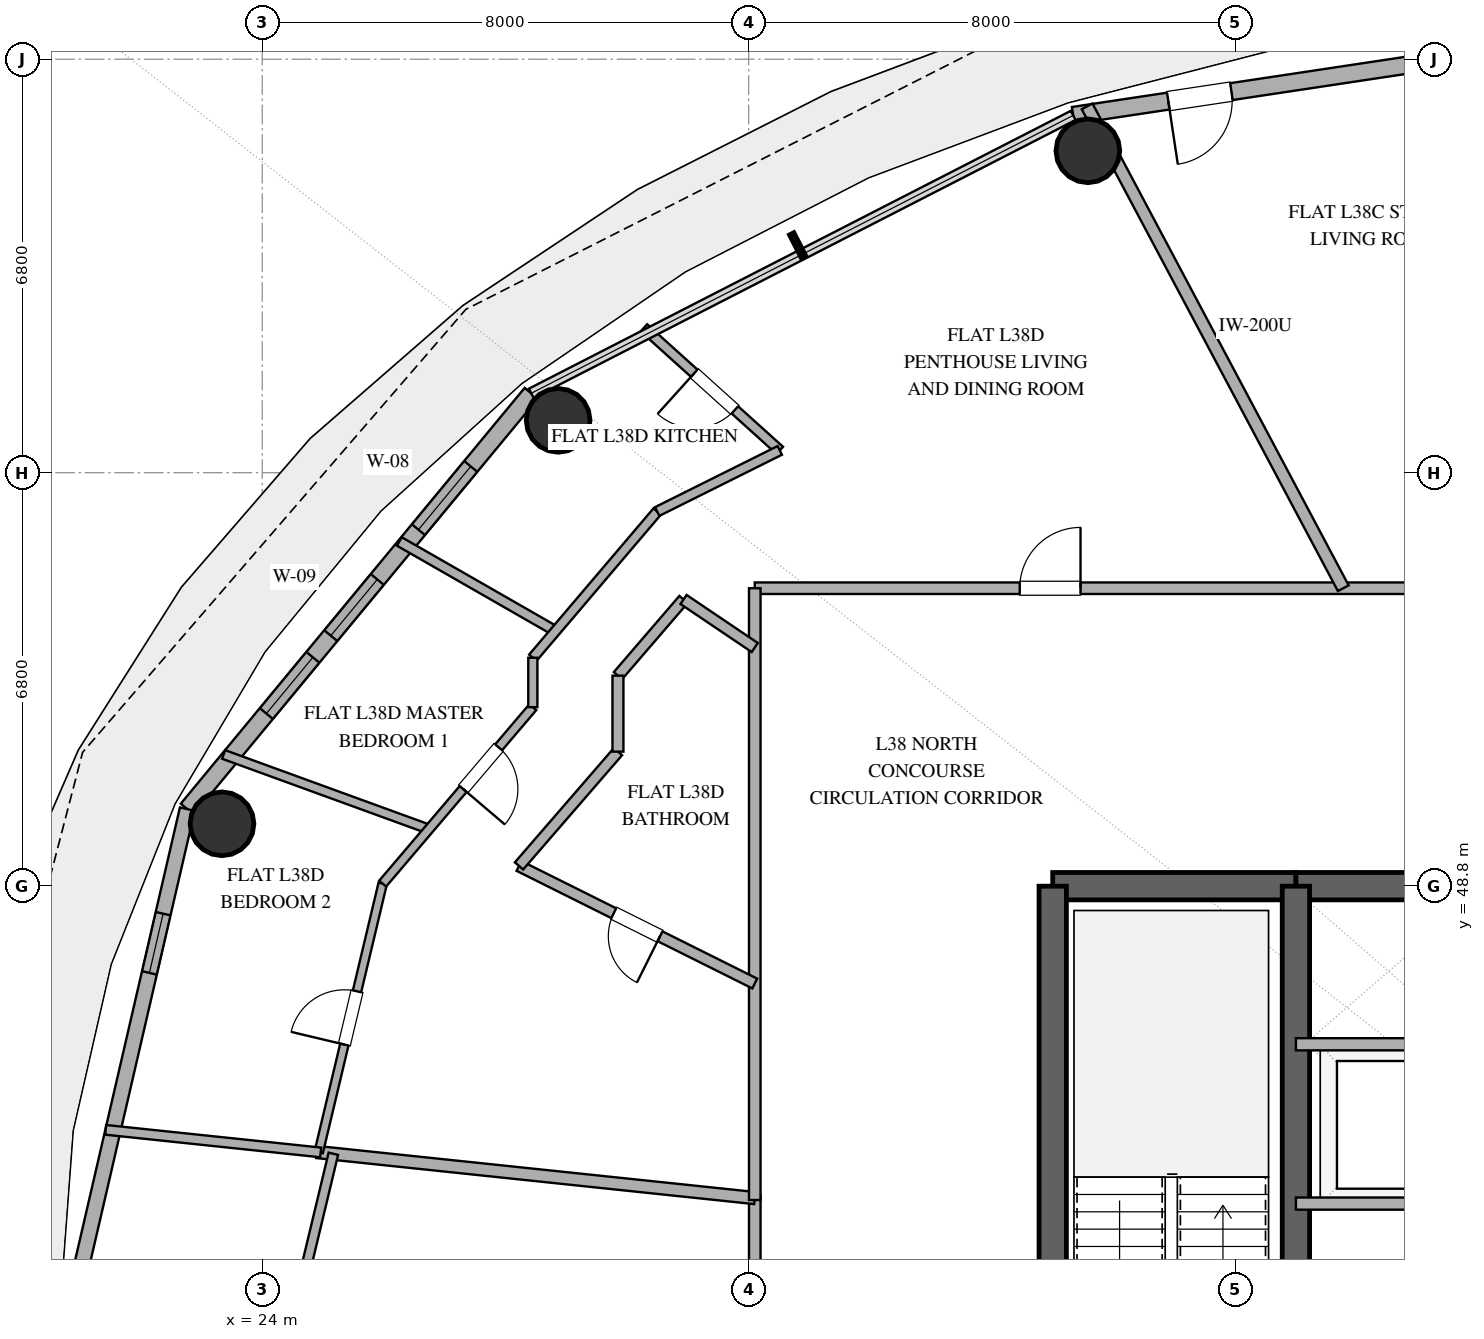
"""IFC4 building model, lengths in metres.
Left out: names, types, materials, properties, quantities, classifications, styles, units other than length and angle.
Written with IfcOpenShell. Run it as: python <this file> out.ifc"""

import sys

from ifc_helpers import new_model, si_unit, direction, frame, frame_2d, origin, origin_2d, place, context, subcontext, project, spatial, rectangle, hollow_circle, extrude, element, fill, save


model = new_model("IFC4")
c1 = context("Model", 3, precision=1e-05, world=origin(), true_north=direction((0.0, 1.0)))
c2 = subcontext(c1, "Body", "Model", "MODEL_VIEW")
j1 = project(units=[si_unit("LENGTHUNIT", "METRE"), si_unit("PLANEANGLEUNIT", "RADIAN")], contexts=[c1])
p1 = place(None, origin())
s1 = spatial("IfcSite", under=j1, at=p1, CompositionType="ELEMENT")
p2 = place(p1, origin())
s2 = spatial("IfcBuilding", under=s1, at=p2, CompositionType="ELEMENT")
p3 = place(p2, frame((0.0, 0.0, 154.2)))
s3 = spatial("IfcBuildingStorey", under=s2, at=p3, CompositionType="ELEMENT", Elevation=154.2)
p4 = place(p3, frame((37.0, 48.8, 0.0), z_axis=(0.0, 0.0, 1.0), x_axis=(1.0, 0.0, 0.0)))
e1 = element("IfcWall", 1, at=p4, inside=s3, PredefinedType="SHEAR", context=c2, shape_type="SweptSolid", body=[
    extrude(rectangle(XDim=4.0, YDim=0.45, at=frame_2d((2.0, 0.0))), origin(), (0.0, 0.0, 1.0), 3.38),
])
p5 = place(p3, frame((41.0, 48.8, 0.0), z_axis=(0.0, 0.0, 1.0), x_axis=(1.0, 0.0, 0.0)))
e2 = element("IfcWall", 2, at=p5, inside=s3, PredefinedType="SHEAR", context=c2, shape_type="SweptSolid", body=[
    extrude(rectangle(XDim=14.0, YDim=0.45, at=frame_2d((7.0, 0.0))), origin(), (0.0, 0.0, 1.0), 3.38),
])
p6 = place(p5, frame((6.1, 0.0, 0.0)))
e3 = element("IfcOpeningElement", 3, at=p6, cuts=e2, PredefinedType="OPENING", context=c2, shape_type="SweptSolid", body=[
    extrude(rectangle(XDim=1.8, YDim=2.25, at=frame_2d((0.9, 1.125))), frame((0.0, 0.235, 0.0), z_axis=(0.0, -1.0, 0.0), x_axis=(1.0, 0.0, 0.0)), (0.0, 0.0, 1.0), 0.47),
])
p7 = place(p3, frame((37.0, 35.2, 0.0), z_axis=(0.0, 0.0, 1.0), x_axis=(0.0, 1.0, 0.0)))
e4 = element("IfcWall", 4, at=p7, inside=s3, PredefinedType="SHEAR", context=c2, shape_type="SweptSolid", body=[
    extrude(rectangle(XDim=13.6, YDim=0.45, at=frame_2d((6.8, 0.0))), origin(), (0.0, 0.0, 1.0), 3.38),
])
p8 = place(p3, frame((41.0, 35.2, 0.0), z_axis=(0.0, 0.0, 1.0), x_axis=(0.0, 1.0, 0.0)))
e5 = element("IfcWall", 5, at=p8, inside=s3, PredefinedType="SHEAR", context=c2, shape_type="SweptSolid", body=[
    extrude(rectangle(XDim=13.6, YDim=0.45, at=frame_2d((6.8, 0.0))), origin(), (0.0, 0.0, 1.0), 3.38),
])
p9 = place(p8, frame((1.15, 0.0, 0.0)))
e6 = element("IfcOpeningElement", 6, at=p9, cuts=e5, PredefinedType="OPENING", context=c2, shape_type="SweptSolid", body=[
    extrude(rectangle(XDim=1.1, YDim=2.2, at=frame_2d((0.55, 1.1))), frame((0.0, 0.235, 0.0), z_axis=(0.0, -1.0, 0.0), x_axis=(1.0, 0.0, 0.0)), (0.0, 0.0, 1.0), 0.47),
])
for number, where, z_axis, x_axis in (
    (7, (37.578, 60.893, 0.0), (0.0, 0.0, 1.0), (1.0, 0.0, 0.0)),
    (8, (28.866, 56.46, 0.0), (0.0, 0.0, 1.0), (1.0, 0.0, 0.0)),
    (9, (23.338, 49.826, 0.0), (0.0, 0.0, 1.0), (1.0, 0.0, 0.0)),
):
    element("IfcColumn", number, at=place(p3, frame(where, z_axis=z_axis, x_axis=x_axis)), inside=s3, PredefinedType="COLUMN", context=c2, shape_type="SweptSolid", body=[
        extrude(hollow_circle(Radius=0.525, WallThickness=0.028, at=origin_2d()), origin(), (0.0, 0.0, 1.0), 3.38),
    ])
p10 = place(p3, frame((48.0, 63.08, 0.0), z_axis=(0.0, 0.0, 1.0), x_axis=(-0.988863993413, -0.148822049884, 0.0)))
e10 = element("IfcWall", 10, at=p10, inside=s3, PredefinedType="SOLIDWALL", context=c2, shape_type="SweptSolid", body=[
    extrude(rectangle(XDim=10.783, YDim=0.28, at=frame_2d((5.392, 0.0))), origin(), (0.0, 0.0, 1.0), 3.38),
])
p11 = place(p10, frame((8.151, 0.0, 0.0)))
e11 = element("IfcOpeningElement", 11, at=p11, cuts=e10, PredefinedType="OPENING", context=c2, shape_type="SweptSolid", body=[
    extrude(rectangle(XDim=1.05, YDim=2.2, at=frame_2d((0.525, 1.1))), frame((0.0, 0.15, 0.0), z_axis=(0.0, -1.0, 0.0), x_axis=(1.0, 0.0, 0.0)), (0.0, 0.0, 1.0), 0.3),
])
p12 = place(p3, frame((28.424, 56.906, 0.0), z_axis=(0.0, 0.0, 1.0), x_axis=(-0.637333477683, -0.770588111915, 0.0)))
e12 = element("IfcWall", 12, at=p12, inside=s3, PredefinedType="SOLIDWALL", context=c2, shape_type="SweptSolid", body=[
    extrude(rectangle(XDim=8.875, YDim=0.28, at=frame_2d((4.438, 0.0))), origin(), (0.0, 0.0, 1.0), 3.38),
])
p13 = place(p12, frame((1.561, 0.0, 0.85)))
e13 = element("IfcOpeningElement", 13, at=p13, cuts=e12, PredefinedType="OPENING", context=c2, shape_type="SweptSolid", body=[
    extrude(rectangle(XDim=1.35, YDim=1.8, at=frame_2d((0.675, 0.9))), frame((0.0, 0.15, 0.0), z_axis=(0.0, -1.0, 0.0), x_axis=(1.0, 0.0, 0.0)), (0.0, 0.0, 1.0), 0.3),
])
p14 = place(p12, frame((3.973, 0.0, 0.85)))
e14 = element("IfcOpeningElement", 14, at=p14, cuts=e12, PredefinedType="OPENING", context=c2, shape_type="SweptSolid", body=[
    extrude(rectangle(XDim=1.2, YDim=1.8, at=frame_2d((0.6, 0.9))), frame((0.0, 0.15, 0.0), z_axis=(0.0, -1.0, 0.0), x_axis=(1.0, 0.0, 0.0)), (0.0, 0.0, 1.0), 0.3),
])
p15 = place(p12, frame((5.635, 0.0, 0.85)))
e15 = element("IfcOpeningElement", 15, at=p15, cuts=e12, PredefinedType="OPENING", context=c2, shape_type="SweptSolid", body=[
    extrude(rectangle(XDim=1.2, YDim=1.8, at=frame_2d((0.6, 0.9))), frame((0.0, 0.15, 0.0), z_axis=(0.0, -1.0, 0.0), x_axis=(1.0, 0.0, 0.0)), (0.0, 0.0, 1.0), 0.3),
])
p16 = place(p3, frame((22.768, 50.067, 0.0), z_axis=(0.0, 0.0, 1.0), x_axis=(-0.225473184558, -0.974249374157, 0.0)))
e16 = element("IfcWall", 16, at=p16, inside=s3, PredefinedType="SOLIDWALL", context=c2, shape_type="SweptSolid", body=[
    extrude(rectangle(XDim=8.28, YDim=0.25, at=frame_2d((4.14, 0.0))), origin(), (0.0, 0.0, 1.0), 3.38),
])
p17 = place(p16, frame((1.764, 0.0, 1.42)))
e17 = element("IfcOpeningElement", 17, at=p17, cuts=e16, PredefinedType="OPENING", context=c2, shape_type="SweptSolid", body=[
    extrude(rectangle(XDim=1.0, YDim=1.05, at=frame_2d((0.5, 0.525))), frame((0.0, 0.135, 0.0), z_axis=(0.0, -1.0, 0.0), x_axis=(1.0, 0.0, 0.0)), (0.0, 0.0, 1.0), 0.27),
])
for number, where, z_axis, x_axis in (
    (18, (41.0, 46.2, 0.0), (0.0, 0.0, 1.0), (1.0, 0.0, 0.0)),
    (19, (41.0, 43.58, 0.0), (0.0, 0.0, 1.0), (1.0, 0.0, 0.0)),
):
    element("IfcWall", number, at=place(p3, frame(where, z_axis=z_axis, x_axis=x_axis)), inside=s3, PredefinedType="SOLIDWALL", context=c2, shape_type="SweptSolid", body=[
        extrude(rectangle(XDim=2.95, YDim=0.2, at=frame_2d((1.475, 0.0))), origin(), (0.0, 0.0, 1.0), 2.74),
    ])
p18 = place(p3, frame((32.1, 53.7, 0.0), z_axis=(0.0, 0.0, 1.0), x_axis=(1.0, 0.0, 0.0)))
e20 = element("IfcWall", 20, at=p18, inside=s3, PredefinedType="PARTITIONING", context=c2, shape_type="SweptSolid", body=[
    extrude(rectangle(XDim=17.576, YDim=0.19, at=frame_2d((8.788, 0.0))), origin(), (0.0, 0.0, 1.0), 2.74),
])
p19 = place(p18, frame((4.358, 0.0, 0.0)))
e21 = element("IfcOpeningElement", 21, at=p19, cuts=e20, PredefinedType="OPENING", context=c2, shape_type="SweptSolid", body=[
    extrude(rectangle(XDim=1.0, YDim=2.2, at=frame_2d((0.5, 1.1))), frame((0.0, 0.105, 0.0), z_axis=(0.0, -1.0, 0.0), x_axis=(1.0, 0.0, 0.0)), (0.0, 0.0, 1.0), 0.21),
])
p20 = place(p18, frame((11.706, 0.0, 0.0)))
e22 = element("IfcOpeningElement", 22, at=p20, cuts=e20, PredefinedType="OPENING", context=c2, shape_type="SweptSolid", body=[
    extrude(rectangle(XDim=1.0, YDim=2.2, at=frame_2d((0.5, 1.1))), frame((0.0, 0.105, 0.0), z_axis=(0.0, -1.0, 0.0), x_axis=(1.0, 0.0, 0.0)), (0.0, 0.0, 1.0), 0.21),
])
p21 = place(p3, frame((37.566, 61.624, 0.0), z_axis=(0.0, 0.0, 1.0), x_axis=(0.469466796814, -0.882950126955, 0.0)))
e23 = element("IfcWall", 23, at=p21, inside=s3, PredefinedType="PARTITIONING", context=c2, shape_type="SweptSolid", body=[
    extrude(rectangle(XDim=8.975, YDim=0.2, at=frame_2d((4.487, 0.0))), origin(), (0.0, 0.0, 1.0), 2.74),
])
p22 = place(p3, frame((32.1, 30.3, 0.0), z_axis=(0.0, 0.0, 1.0), x_axis=(0.0, 1.0, 0.0)))
e24 = element("IfcWall", 24, at=p22, inside=s3, PredefinedType="PARTITIONING", context=c2, shape_type="SweptSolid", body=[
    extrude(rectangle(XDim=13.403, YDim=0.19, at=frame_2d((6.702, 0.0))), origin(), (0.0, 0.0, 1.0), 2.74),
])
p23 = place(p22, frame((3.531, 0.0, 0.0)))
e25 = element("IfcOpeningElement", 25, at=p23, cuts=e24, PredefinedType="OPENING", context=c2, shape_type="SweptSolid", body=[
    extrude(rectangle(XDim=1.0, YDim=2.2, at=frame_2d((0.5, 1.1))), frame((0.0, 0.105, 0.0), z_axis=(0.0, -1.0, 0.0), x_axis=(1.0, 0.0, 0.0)), (0.0, 0.0, 1.0), 0.21),
])
p24 = place(p3, frame((32.1, 43.671, 0.0), z_axis=(0.0, 0.0, 1.0), x_axis=(-0.994522615629, 0.104521610217, 0.0)))
e26 = element("IfcWall", 26, at=p24, inside=s3, PredefinedType="PARTITIONING", context=c2, shape_type="SweptSolid", body=[
    extrude(rectangle(XDim=7.243, YDim=0.2, at=frame_2d((3.622, 0.0))), origin(), (0.0, 0.0, 1.0), 2.74),
])
p25 = place(p3, frame((32.1, 43.639, 0.0), z_axis=(0.0, 0.0, 1.0), x_axis=(0.0, 1.0, 0.0)))
e27 = element("IfcWall", 27, at=p25, inside=s3, PredefinedType="PARTITIONING", context=c2, shape_type="SweptSolid", body=[
    extrude(rectangle(XDim=10.061, YDim=0.19, at=frame_2d((5.031, 0.0))), origin(), (0.0, 0.0, 1.0), 2.74),
])
p26 = place(p3, frame((24.929, 44.425, 0.0), z_axis=(0.0, 0.0, 1.0), x_axis=(0.23166656053, 0.972795253243, 0.0)))
e28 = element("IfcWall", 28, at=p26, inside=s3, PredefinedType="PARTITIONING", context=c2, shape_type="SweptSolid", body=[
    extrude(rectangle(XDim=4.541, YDim=0.14, at=frame_2d((2.271, 0.0))), origin(), (0.0, 0.0, 1.0), 2.74),
])
p27 = place(p26, frame((1.821, 0.0, 0.0)))
e29 = element("IfcOpeningElement", 29, at=p27, cuts=e28, PredefinedType="OPENING", context=c2, shape_type="SweptSolid", body=[
    extrude(rectangle(XDim=0.9, YDim=2.1, at=frame_2d((0.45, 1.05))), frame((0.0, 0.08, 0.0), z_axis=(0.0, -1.0, 0.0), x_axis=(1.0, 0.0, 0.0)), (0.0, 0.0, 1.0), 0.16),
])
p28 = place(p3, frame((32.1, 47.199, 0.0), z_axis=(0.0, 0.0, 1.0), x_axis=(-0.89485499518, 0.446356962084, 0.0)))
e30 = element("IfcWall", 30, at=p28, inside=s3, PredefinedType="PLUMBINGWALL", context=c2, shape_type="SweptSolid", body=[
    extrude(rectangle(XDim=4.333, YDim=0.18, at=frame_2d((2.167, 0.0))), origin(), (0.0, 0.0, 1.0), 2.74),
])
p29 = place(p28, frame((1.741, 0.0, 0.0)))
e31 = element("IfcOpeningElement", 31, at=p29, cuts=e30, PredefinedType="OPENING", context=c2, shape_type="SweptSolid", body=[
    extrude(rectangle(XDim=0.85, YDim=2.1, at=frame_2d((0.425, 1.05))), frame((0.0, 0.1, 0.0), z_axis=(0.0, -1.0, 0.0), x_axis=(1.0, 0.0, 0.0)), (0.0, 0.0, 1.0), 0.2),
])
p30 = place(p3, frame((26.742, 49.737, 0.0), z_axis=(0.0, 0.0, 1.0), x_axis=(-0.939702146374, 0.341993970854, 0.0)))
e32 = element("IfcWall", 32, at=p30, inside=s3, PredefinedType="PARTITIONING", context=c2, shape_type="SweptSolid", body=[
    extrude(rectangle(XDim=3.594, YDim=0.15, at=frame_2d((1.797, 0.0))), origin(), (0.0, 0.0, 1.0), 2.74),
])
p31 = place(p3, frame((21.425, 44.793, 0.0), z_axis=(0.0, 0.0, 1.0), x_axis=(0.994516359121, -0.104581123727, 0.0)))
e33 = element("IfcWall", 33, at=p31, inside=s3, PredefinedType="PLUMBINGWALL", context=c2, shape_type="SweptSolid", body=[
    extrude(rectangle(XDim=3.555, YDim=0.16, at=frame_2d((1.778, 0.0))), origin(), (0.0, 0.0, 1.0), 2.74),
])
p32 = place(p3, frame((32.512, 55.967, 0.0), z_axis=(0.0, 0.0, 1.0), x_axis=(-0.74263222061, 0.669699473579, 0.0)))
e34 = element("IfcWall", 34, at=p32, inside=s3, PredefinedType="PLUMBINGWALL", context=c2, shape_type="SweptSolid", body=[
    extrude(rectangle(XDim=3.009, YDim=0.16, at=frame_2d((1.505, 0.0))), origin(), (0.0, 0.0, 1.0), 2.74),
])
p33 = place(p32, frame((0.995, 0.0, 0.0)))
e35 = element("IfcOpeningElement", 35, at=p33, cuts=e34, PredefinedType="OPENING", context=c2, shape_type="SweptSolid", body=[
    extrude(rectangle(XDim=0.9, YDim=2.1, at=frame_2d((0.45, 1.05))), frame((0.0, 0.09, 0.0), z_axis=(0.0, -1.0, 0.0), x_axis=(1.0, 0.0, 0.0)), (0.0, 0.0, 1.0), 0.18),
])
p34 = place(p3, frame((26.255, 54.469, 0.0), z_axis=(0.0, 0.0, 1.0), x_axis=(0.867481094493, -0.497470150558, 0.0)))
e36 = element("IfcWall", 36, at=p34, inside=s3, PredefinedType="PLUMBINGWALL", context=c2, shape_type="SweptSolid", body=[
    extrude(rectangle(XDim=2.961, YDim=0.16, at=frame_2d((1.48, 0.0))), origin(), (0.0, 0.0, 1.0), 2.74),
])
p35 = place(p3, frame((28.45, 51.744, 0.0), z_axis=(0.0, 0.0, 1.0), x_axis=(-0.648090958091, -0.761562938988, 0.0)))
e37 = element("IfcWall", 37, at=p35, inside=s3, PredefinedType="PARTITIONING", context=c2, shape_type="SweptSolid", body=[
    extrude(rectangle(XDim=3.81, YDim=0.15, at=frame_2d((1.905, 0.0))), origin(), (0.0, 0.0, 1.0), 2.74),
])
p36 = place(p35, frame((0.868, 0.0, 0.0)))
e38 = element("IfcOpeningElement", 38, at=p36, cuts=e37, PredefinedType="OPENING", context=c2, shape_type="SweptSolid", body=[
    extrude(rectangle(XDim=0.9, YDim=2.1, at=frame_2d((0.45, 1.05))), frame((0.0, 0.085, 0.0), z_axis=(0.0, -1.0, 0.0), x_axis=(1.0, 0.0, 0.0)), (0.0, 0.0, 1.0), 0.17),
])
p37 = place(p3, frame((28.45, 52.557, 0.0), z_axis=(0.0, 0.0, 1.0), x_axis=(0.647888606369, 0.761735094201, 0.0)))
e39 = element("IfcWall", 39, at=p37, inside=s3, PredefinedType="PLUMBINGWALL", context=c2, shape_type="SweptSolid", body=[
    extrude(rectangle(XDim=3.157, YDim=0.16, at=frame_2d((1.578, 0.0))), origin(), (0.0, 0.0, 1.0), 2.74),
])
p38 = place(p3, frame((28.223, 49.133, 0.0), z_axis=(0.0, 0.0, 1.0), x_axis=(0.654567839364, 0.756003269616, 0.0)))
e40 = element("IfcWall", 40, at=p38, inside=s3, PredefinedType="PLUMBINGWALL", context=c2, shape_type="SweptSolid", body=[
    extrude(rectangle(XDim=2.486, YDim=0.18, at=frame_2d((1.243, 0.0))), origin(), (0.0, 0.0, 1.0), 2.74),
])
p39 = place(p3, frame((25.169, 44.4, 0.0), z_axis=(0.0, 0.0, 1.0), x_axis=(-0.233096038601, -0.972453719613, 0.0)))
e41 = element("IfcWall", 41, at=p39, inside=s3, PredefinedType="PLUMBINGWALL", context=c2, shape_type="SweptSolid", body=[
    extrude(rectangle(XDim=2.468, YDim=0.16, at=frame_2d((1.234, 0.0))), origin(), (0.0, 0.0, 1.0), 2.74),
])
p40 = place(p3, frame((30.495, 54.961, 0.0), z_axis=(0.0, 0.0, 1.0), x_axis=(0.894946652065, 0.446173161405, 0.0)))
e42 = element("IfcWall", 42, at=p40, inside=s3, PredefinedType="PLUMBINGWALL", context=c2, shape_type="SweptSolid", body=[
    extrude(rectangle(XDim=2.253, YDim=0.16, at=frame_2d((1.127, 0.0))), origin(), (0.0, 0.0, 1.0), 2.74),
])
p41 = place(p3, frame((29.85, 52.262, 0.0), z_axis=(0.0, 0.0, 1.0), x_axis=(0.652334661778, 0.757931058239, 0.0)))
e43 = element("IfcWall", 43, at=p41, inside=s3, PredefinedType="PLUMBINGWALL", context=c2, shape_type="SweptSolid", body=[
    extrude(rectangle(XDim=1.653, YDim=0.18, at=frame_2d((0.827, 0.0))), origin(), (0.0, 0.0, 1.0), 2.74),
])
p42 = place(p3, frame((30.928, 53.515, 0.0), z_axis=(0.0, 0.0, 1.0), x_axis=(0.829034879431, -0.55919689617, 0.0)))
e44 = element("IfcWall", 44, at=p42, inside=s3, PredefinedType="PLUMBINGWALL", context=c2, shape_type="SweptSolid", body=[
    extrude(rectangle(XDim=1.413, YDim=0.18, at=frame_2d((0.707, 0.0))), origin(), (0.0, 0.0, 1.0), 2.74),
])
p43 = place(p3, frame((29.85, 51.013, 0.0), z_axis=(0.0, 0.0, 1.0), x_axis=(0.0, 1.0, 0.0)))
e45 = element("IfcWall", 45, at=p43, inside=s3, PredefinedType="PLUMBINGWALL", context=c2, shape_type="SweptSolid", body=[
    extrude(rectangle(XDim=1.249, YDim=0.18, at=frame_2d((0.625, 0.0))), origin(), (0.0, 0.0, 1.0), 2.74),
])
p44 = place(p3, frame((28.45, 52.557, 0.0), z_axis=(0.0, 0.0, 1.0), x_axis=(0.0, -1.0, 0.0)))
e46 = element("IfcWall", 46, at=p44, inside=s3, PredefinedType="PARTITIONING", context=c2, shape_type="SweptSolid", body=[
    extrude(rectangle(XDim=0.812, YDim=0.15, at=frame_2d((0.406, 0.0))), origin(), (0.0, 0.0, 1.0), 2.74),
])
p45 = place(p11, origin())
e47 = element("IfcDoor", 47, at=p45, inside=s3, OperationType="SINGLE_SWING_RIGHT", PredefinedType="DOOR", context=c2, shape_type="SweptSolid", body=[
    extrude(rectangle(XDim=1.05, YDim=2.2, at=frame_2d((0.525, 1.1))), frame((0.0, 0.025, 0.0), z_axis=(0.0, -1.0, 0.0), x_axis=(1.0, 0.0, 0.0)), (0.0, 0.0, 1.0), 0.05),
])
fill(e11, e47)
p46 = place(p13, origin())
e48 = element("IfcWindow", 48, at=p46, inside=s3, PartitioningType="SINGLE_PANEL", PredefinedType="WINDOW", context=c2, shape_type="SweptSolid", body=[
    extrude(rectangle(XDim=1.35, YDim=1.8, at=frame_2d((0.675, 0.9))), frame((0.0, 0.03, 0.0), z_axis=(0.0, -1.0, 0.0), x_axis=(1.0, 0.0, 0.0)), (0.0, 0.0, 1.0), 0.06),
])
fill(e13, e48)
p47 = place(p14, origin())
e49 = element("IfcWindow", 49, at=p47, inside=s3, PartitioningType="SINGLE_PANEL", PredefinedType="WINDOW", context=c2, shape_type="SweptSolid", body=[
    extrude(rectangle(XDim=1.2, YDim=1.8, at=frame_2d((0.6, 0.9))), frame((0.0, 0.03, 0.0), z_axis=(0.0, -1.0, 0.0), x_axis=(1.0, 0.0, 0.0)), (0.0, 0.0, 1.0), 0.06),
])
fill(e14, e49)
p48 = place(p15, origin())
e50 = element("IfcWindow", 50, at=p48, inside=s3, PartitioningType="SINGLE_PANEL", PredefinedType="WINDOW", context=c2, shape_type="SweptSolid", body=[
    extrude(rectangle(XDim=1.2, YDim=1.8, at=frame_2d((0.6, 0.9))), frame((0.0, 0.03, 0.0), z_axis=(0.0, -1.0, 0.0), x_axis=(1.0, 0.0, 0.0)), (0.0, 0.0, 1.0), 0.06),
])
fill(e15, e50)
p49 = place(p17, origin())
e51 = element("IfcWindow", 51, at=p49, inside=s3, PartitioningType="SINGLE_PANEL", PredefinedType="WINDOW", context=c2, shape_type="SweptSolid", body=[
    extrude(rectangle(XDim=1.0, YDim=1.05, at=frame_2d((0.5, 0.525))), frame((0.0, 0.03, 0.0), z_axis=(0.0, -1.0, 0.0), x_axis=(1.0, 0.0, 0.0)), (0.0, 0.0, 1.0), 0.06),
])
fill(e17, e51)
p50 = place(p19, origin())
e52 = element("IfcDoor", 52, at=p50, inside=s3, OperationType="SINGLE_SWING_RIGHT", PredefinedType="DOOR", context=c2, shape_type="SweptSolid", body=[
    extrude(rectangle(XDim=1.0, YDim=2.2, at=frame_2d((0.5, 1.1))), frame((0.0, 0.025, 0.0), z_axis=(0.0, -1.0, 0.0), x_axis=(1.0, 0.0, 0.0)), (0.0, 0.0, 1.0), 0.05),
])
fill(e21, e52)
p51 = place(p27, origin())
e53 = element("IfcDoor", 53, at=p51, inside=s3, OperationType="SINGLE_SWING_LEFT", PredefinedType="DOOR", context=c2, shape_type="SweptSolid", body=[
    extrude(rectangle(XDim=0.9, YDim=2.1, at=frame_2d((0.45, 1.05))), frame((0.0, 0.025, 0.0), z_axis=(0.0, -1.0, 0.0), x_axis=(1.0, 0.0, 0.0)), (0.0, 0.0, 1.0), 0.05),
])
fill(e29, e53)
p52 = place(p29, origin())
e54 = element("IfcDoor", 54, at=p52, inside=s3, OperationType="SINGLE_SWING_LEFT", PredefinedType="DOOR", context=c2, shape_type="SweptSolid", body=[
    extrude(rectangle(XDim=0.85, YDim=2.1, at=frame_2d((0.425, 1.05))), frame((0.0, 0.025, 0.0), z_axis=(0.0, -1.0, 0.0), x_axis=(1.0, 0.0, 0.0)), (0.0, 0.0, 1.0), 0.05),
])
fill(e31, e54)
p53 = place(p33, origin())
e55 = element("IfcDoor", 55, at=p53, inside=s3, OperationType="SINGLE_SWING_RIGHT", PredefinedType="DOOR", context=c2, shape_type="SweptSolid", body=[
    extrude(rectangle(XDim=0.9, YDim=2.1, at=frame_2d((0.45, 1.05))), frame((0.0, 0.025, 0.0), z_axis=(0.0, -1.0, 0.0), x_axis=(1.0, 0.0, 0.0)), (0.0, 0.0, 1.0), 0.05),
])
fill(e35, e55)
p54 = place(p36, origin())
e56 = element("IfcDoor", 56, at=p54, inside=s3, OperationType="SINGLE_SWING_RIGHT", PredefinedType="DOOR", context=c2, shape_type="SweptSolid", body=[
    extrude(rectangle(XDim=0.9, YDim=2.1, at=frame_2d((0.45, 1.05))), frame((0.0, 0.025, 0.0), z_axis=(0.0, -1.0, 0.0), x_axis=(1.0, 0.0, 0.0)), (0.0, 0.0, 1.0), 0.05),
])
fill(e38, e56)
save(model, sys.argv[1])
